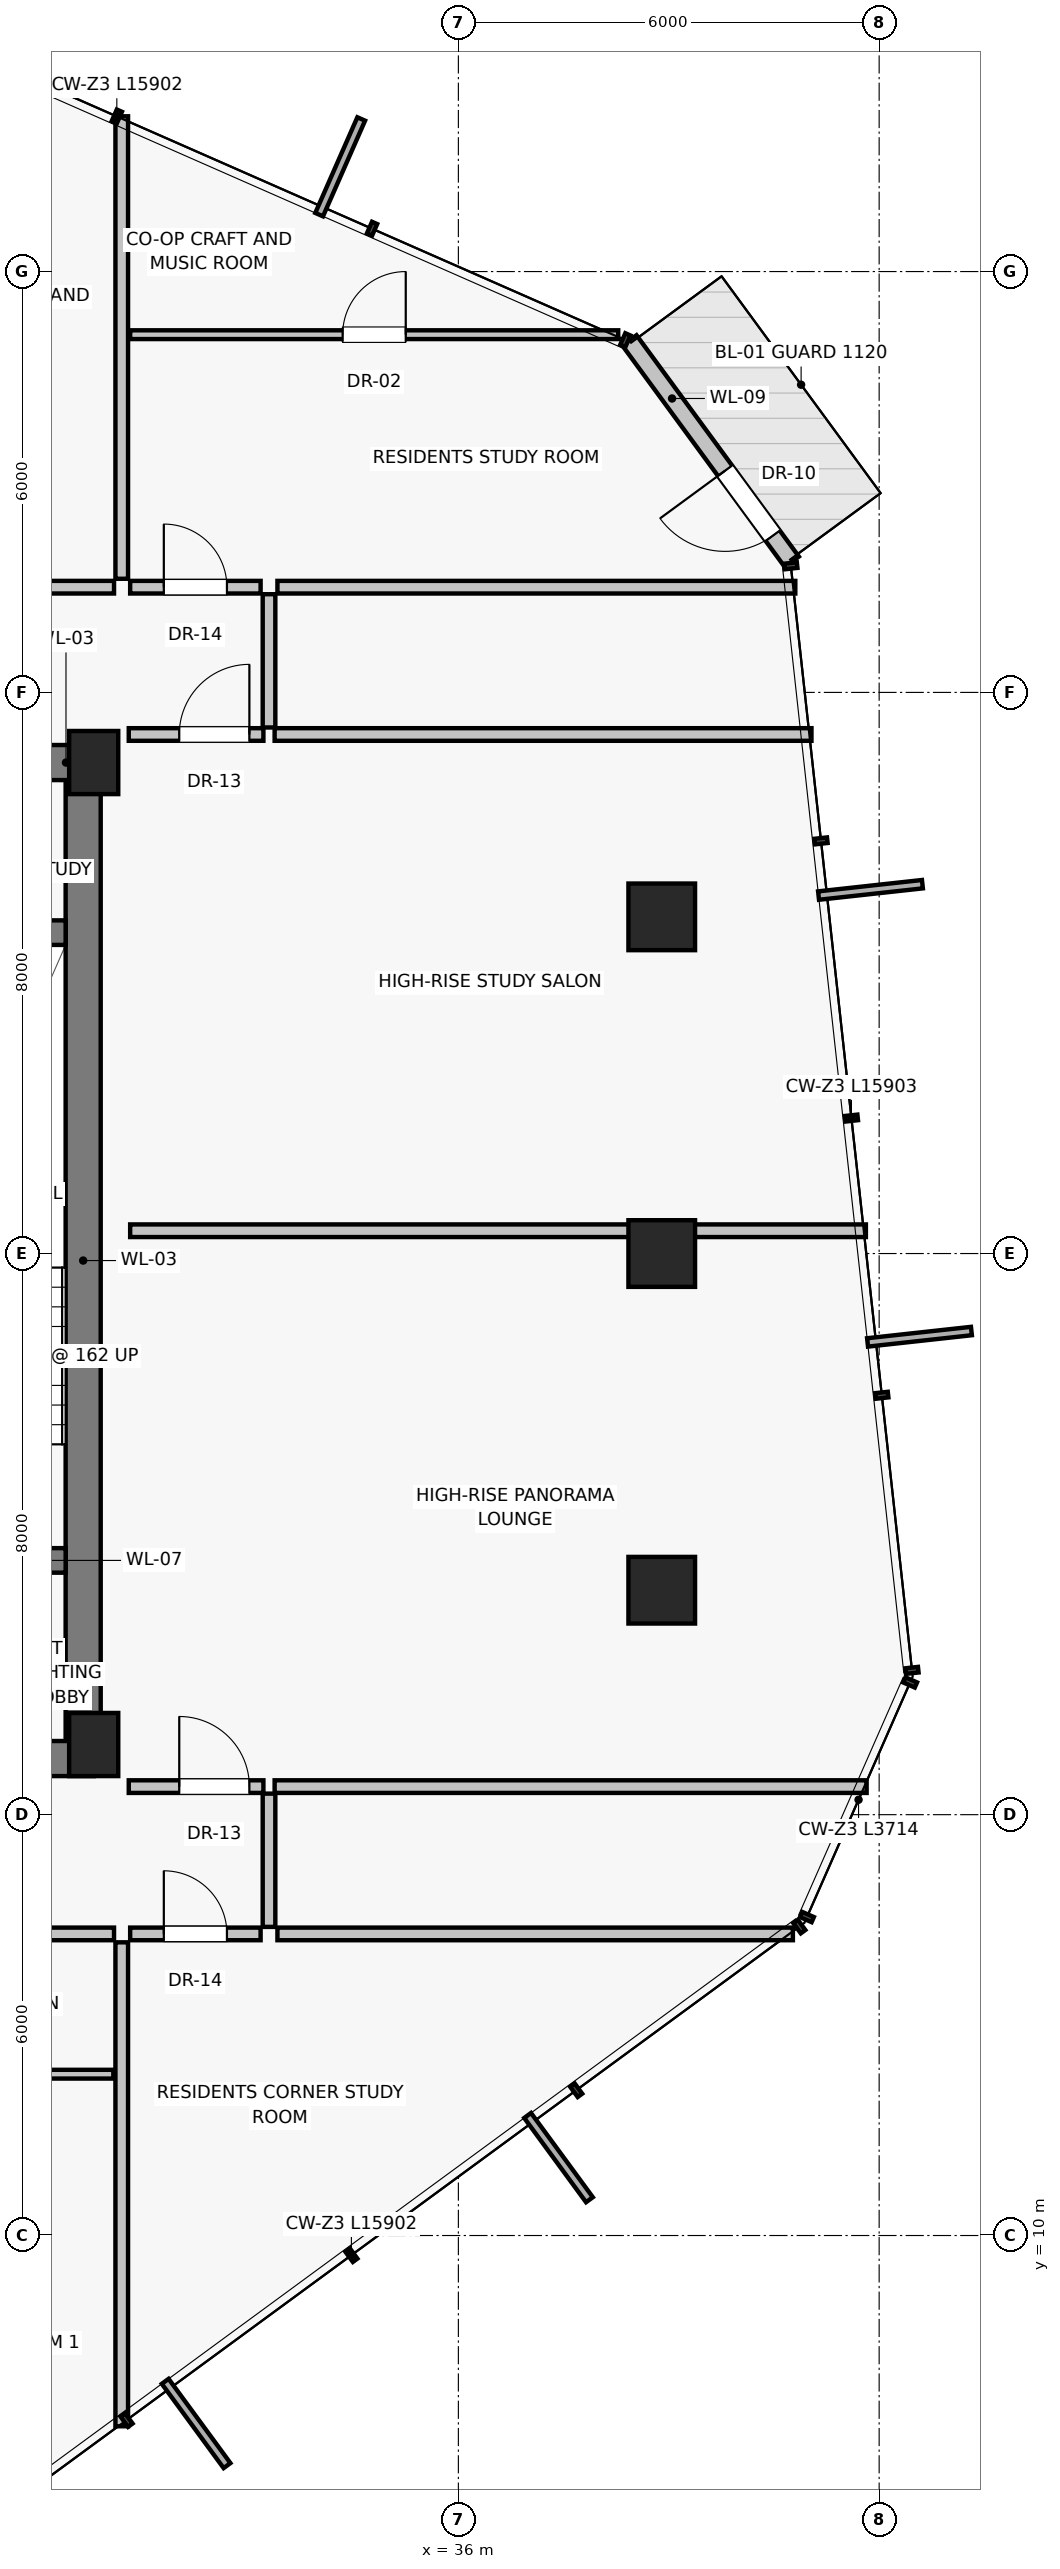
"""IFC4 building model, lengths in metres.
Left out: names, types, materials, properties, quantities, classifications, styles, units other than length and angle.
Written with IfcOpenShell. Run it as: python <this file> out.ifc"""

import sys

from ifc_helpers import new_model, si_unit, direction, frame, frame_2d, origin, origin_2d, place, context, subcontext, project, spatial, rectangle, extrude, source, transform, mapped, element, fill, save


model = new_model("IFC4")
c1 = context("Model", 3, precision=1e-05, world=origin(), true_north=direction((0.0, 1.0)))
c2 = subcontext(c1, "Body", "Model", "MODEL_VIEW")
j1 = project(units=[si_unit("LENGTHUNIT", "METRE"), si_unit("PLANEANGLEUNIT", "RADIAN")], contexts=[c1])
p1 = place(None, origin())
s1 = spatial("IfcSite", under=j1, at=p1, CompositionType="ELEMENT")
p2 = place(p1, origin())
s2 = spatial("IfcBuilding", under=s1, at=p2, CompositionType="ELEMENT")
p3 = place(p2, frame((0.0, 0.0, 185.35)))
s3 = spatial("IfcBuildingStorey", under=s2, at=p3, CompositionType="ELEMENT", Elevation=185.35)
for number, where, z_axis, x_axis in (
    (1, (30.8, 17.0, 0.0), (0.0, 0.0, 1.0), (1.0, 0.0, 0.0)),
    (2, (30.8, 31.0, 0.0), (0.0, 0.0, 1.0), (1.0, 0.0, 0.0)),
):
    element("IfcColumn", number, at=place(p3, frame(where, z_axis=z_axis, x_axis=x_axis)), inside=s3, PredefinedType="PILASTER", context=c2, shape_type="SweptSolid", body=[
        extrude(rectangle(XDim=0.7, YDim=0.9, at=origin_2d()), origin(), (0.0, 0.0, 1.0), 3.25),
    ])
for number, where, z_axis, x_axis in (
    (3, (38.9, 19.2, 0.0), (0.0, 0.0, 1.0), (1.0, 0.0, 0.0)),
    (4, (38.9, 24.0, 0.0), (0.0, 0.0, 1.0), (1.0, 0.0, 0.0)),
    (5, (38.9, 28.8, 0.0), (0.0, 0.0, 1.0), (1.0, 0.0, 0.0)),
):
    element("IfcColumn", number, at=place(p3, frame(where, z_axis=z_axis, x_axis=x_axis)), inside=s3, PredefinedType="COLUMN", context=c2, shape_type="SweptSolid", body=[
        extrude(rectangle(XDim=0.95, YDim=0.95, at=origin_2d()), origin(), (0.0, 0.0, 1.0), 3.25),
    ])
p4 = place(p3, frame((40.755, 33.862, 0.0), z_axis=(0.0, 0.0, 1.0), x_axis=(-0.591474510033, 0.806323696775, 0.0)))
e6 = element("IfcWall", 6, at=p4, inside=s3, PredefinedType="SOLIDWALL", context=c2, shape_type="SweptSolid", body=[
    extrude(rectangle(XDim=3.915, YDim=0.25, at=frame_2d((1.958, 0.0))), origin(), (0.0, 0.0, 1.0), 3.015),
])
p5 = place(p4, frame((0.46, 0.0, 0.0)))
e7 = element("IfcOpeningElement", 7, at=p5, cuts=e6, PredefinedType="OPENING", context=c2, shape_type="SweptSolid", body=[
    extrude(rectangle(XDim=1.15, YDim=2.25, at=frame_2d((0.575, 1.125))), frame((0.0, 0.135, 0.0), z_axis=(0.0, -1.0, 0.0), x_axis=(1.0, 0.0, 0.0)), (0.0, 0.0, 1.0), 0.27),
])
p6 = place(p3, frame((30.65, 16.8, 0.0), z_axis=(0.0, 0.0, 1.0), x_axis=(0.0, 1.0, 0.0)))
e8 = element("IfcWall", 8, at=p6, inside=s3, PredefinedType="SHEAR", context=c2, shape_type="SweptSolid", body=[
    extrude(rectangle(XDim=14.2, YDim=0.5, at=frame_2d((7.1, 0.0))), origin(), (0.0, 0.0, 1.0), 3.015),
])
p7 = place(p3, frame((24.95, 16.8, 0.0), z_axis=(0.0, 0.0, 1.0), x_axis=(1.0, 0.0, 0.0)))
e9 = element("IfcWall", 9, at=p7, inside=s3, PredefinedType="SHEAR", context=c2, shape_type="SweptSolid", body=[
    extrude(rectangle(XDim=5.85, YDim=0.5, at=frame_2d((2.925, 0.0))), origin(), (0.0, 0.0, 1.0), 3.015),
])
p8 = place(p7, frame((2.15, 0.0, 0.0)))
e10 = element("IfcOpeningElement", 10, at=p8, cuts=e9, PredefinedType="OPENING", context=c2, shape_type="SweptSolid", body=[
    extrude(rectangle(XDim=1.2, YDim=2.03, at=frame_2d((0.6, 1.015))), frame((0.0, 0.26, 0.0), z_axis=(0.0, -1.0, 0.0), x_axis=(1.0, 0.0, 0.0)), (0.0, 0.0, 1.0), 0.52),
])
p9 = place(p3, frame((27.0, 31.0, 0.0), z_axis=(0.0, 0.0, 1.0), x_axis=(1.0, 0.0, 0.0)))
e11 = element("IfcWall", 11, at=p9, inside=s3, PredefinedType="SHEAR", context=c2, shape_type="SweptSolid", body=[
    extrude(rectangle(XDim=3.8, YDim=0.5, at=frame_2d((1.9, 0.0))), origin(), (0.0, 0.0, 1.0), 3.015),
])
p10 = place(p9, frame((0.45, 0.0, 0.0)))
e12 = element("IfcOpeningElement", 12, at=p10, cuts=e11, PredefinedType="OPENING", context=c2, shape_type="SweptSolid", body=[
    extrude(rectangle(XDim=0.86, YDim=2.01, at=frame_2d((0.43, 1.005))), frame((0.0, 0.26, 0.0), z_axis=(0.0, -1.0, 0.0), x_axis=(1.0, 0.0, 0.0)), (0.0, 0.0, 1.0), 0.52),
])
p11 = place(p9, frame((1.9, 0.0, 0.0)))
e13 = element("IfcOpeningElement", 13, at=p11, cuts=e11, PredefinedType="OPENING", context=c2, shape_type="SweptSolid", body=[
    extrude(rectangle(XDim=0.86, YDim=2.01, at=frame_2d((0.43, 1.005))), frame((0.0, 0.26, 0.0), z_axis=(0.0, -1.0, 0.0), x_axis=(1.0, 0.0, 0.0)), (0.0, 0.0, 1.0), 0.52),
])
p12 = place(p3, frame((27.025, 19.625, 0.0), z_axis=(0.0, 0.0, 1.0), x_axis=(1.0, 0.0, 0.0)))
e14 = element("IfcWall", 14, at=p12, inside=s3, PredefinedType="SHEAR", context=c2, shape_type="SweptSolid", body=[
    extrude(rectangle(XDim=3.375, YDim=0.35, at=frame_2d((1.688, 0.0))), origin(), (0.0, 0.0, 1.0), 3.015),
])
p13 = place(p12, frame((1.05, 0.0, 0.0)))
e15 = element("IfcOpeningElement", 15, at=p13, cuts=e14, PredefinedType="OPENING", context=c2, shape_type="SweptSolid", body=[
    extrude(rectangle(XDim=1.1, YDim=2.03, at=frame_2d((0.55, 1.015))), frame((0.0, 0.185, 0.0), z_axis=(0.0, -1.0, 0.0), x_axis=(1.0, 0.0, 0.0)), (0.0, 0.0, 1.0), 0.37),
])
p14 = place(p3, frame((27.025, 28.575, 0.0), z_axis=(0.0, 0.0, 1.0), x_axis=(1.0, 0.0, 0.0)))
e16 = element("IfcWall", 16, at=p14, inside=s3, PredefinedType="SHEAR", context=c2, shape_type="SweptSolid", body=[
    extrude(rectangle(XDim=3.375, YDim=0.35, at=frame_2d((1.688, 0.0))), origin(), (0.0, 0.0, 1.0), 3.015),
])
p15 = place(p3, frame((31.2, 14.18, 0.0), z_axis=(0.0, 0.0, 1.0), x_axis=(0.0, -1.0, 0.0)))
e17 = element("IfcWall", 17, at=p15, inside=s3, PredefinedType="PARTITIONING", context=c2, shape_type="SweptSolid", body=[
    extrude(rectangle(XDim=6.899, YDim=0.18, at=frame_2d((3.45, 0.0))), origin(), (0.0, 0.0, 1.0), 3.015),
])
p16 = place(p3, frame((19.31, 14.3, 0.0), z_axis=(0.0, 0.0, 1.0), x_axis=(1.0, 0.0, 0.0)))
e18 = element("IfcWall", 18, at=p16, inside=s3, PredefinedType="PARTITIONING", context=c2, shape_type="SweptSolid", body=[
    extrude(rectangle(XDim=11.78, YDim=0.18, at=frame_2d((5.89, 0.0))), origin(), (0.0, 0.0, 1.0), 3.015),
])
p17 = place(p16, frame((3.98, 0.0, 0.0)))
e19 = element("IfcOpeningElement", 19, at=p17, cuts=e18, PredefinedType="OPENING", context=c2, shape_type="SweptSolid", body=[
    extrude(rectangle(XDim=0.95, YDim=2.02, at=frame_2d((0.475, 1.01))), frame((0.0, 0.1, 0.0), z_axis=(0.0, -1.0, 0.0), x_axis=(1.0, 0.0, 0.0)), (0.0, 0.0, 1.0), 0.2),
])
p18 = place(p3, frame((26.18, 12.3, 0.0), z_axis=(0.0, 0.0, 1.0), x_axis=(1.0, 0.0, 0.0)))
e20 = element("IfcWall", 20, at=p18, inside=s3, PredefinedType="PARTITIONING", context=c2, shape_type="SweptSolid", body=[
    extrude(rectangle(XDim=4.9, YDim=0.125, at=frame_2d((2.45, 0.0))), origin(), (0.0, 0.0, 1.0), 3.015),
])
p19 = place(p3, frame((31.2, 33.62, 0.0), z_axis=(0.0, 0.0, 1.0), x_axis=(0.0, 1.0, 0.0)))
e21 = element("IfcWall", 21, at=p19, inside=s3, PredefinedType="PARTITIONING", context=c2, shape_type="SweptSolid", body=[
    extrude(rectangle(XDim=6.593, YDim=0.18, at=frame_2d((3.297, 0.0))), origin(), (0.0, 0.0, 1.0), 3.015),
])
p20 = place(p3, frame((27.447, 33.5, 0.0), z_axis=(0.0, 0.0, 1.0), x_axis=(1.0, 0.0, 0.0)))
e22 = element("IfcWall", 22, at=p20, inside=s3, PredefinedType="PARTITIONING", context=c2, shape_type="SweptSolid", body=[
    extrude(rectangle(XDim=3.643, YDim=0.18, at=frame_2d((1.822, 0.0))), origin(), (0.0, 0.0, 1.0), 3.015),
])
p21 = place(p20, frame((1.322, 0.0, 0.0)))
e23 = element("IfcOpeningElement", 23, at=p21, cuts=e22, PredefinedType="OPENING", context=c2, shape_type="SweptSolid", body=[
    extrude(rectangle(XDim=1.0, YDim=2.01, at=frame_2d((0.5, 1.005))), frame((0.0, 0.1, 0.0), z_axis=(0.0, -1.0, 0.0), x_axis=(1.0, 0.0, 0.0)), (0.0, 0.0, 1.0), 0.2),
])
p22 = place(p3, frame((31.32, 24.325, 0.0), z_axis=(0.0, 0.0, 1.0), x_axis=(1.0, 0.0, 0.0)))
e24 = element("IfcWall", 24, at=p22, inside=s3, PredefinedType="PARTITIONING", context=c2, shape_type="SweptSolid", body=[
    extrude(rectangle(XDim=10.491, YDim=0.18, at=frame_2d((5.246, 0.0))), origin(), (0.0, 0.0, 1.0), 3.015),
])
p23 = place(p3, frame((33.3, 14.4, 0.0), z_axis=(0.0, 0.0, 1.0), x_axis=(0.0, 1.0, 0.0)))
e25 = element("IfcWall", 25, at=p23, inside=s3, PredefinedType="PARTITIONING", context=c2, shape_type="SweptSolid", body=[
    extrude(rectangle(XDim=1.9, YDim=0.18, at=frame_2d((0.95, 0.0))), origin(), (0.0, 0.0, 1.0), 3.015),
])
p24 = place(p3, frame((33.3, 31.5, 0.0), z_axis=(0.0, 0.0, 1.0), x_axis=(0.0, 1.0, 0.0)))
e26 = element("IfcWall", 26, at=p24, inside=s3, PredefinedType="PARTITIONING", context=c2, shape_type="SweptSolid", body=[
    extrude(rectangle(XDim=1.9, YDim=0.18, at=frame_2d((0.95, 0.0))), origin(), (0.0, 0.0, 1.0), 3.015),
])
p25 = place(p3, frame((31.3, 16.4, 0.0), z_axis=(0.0, 0.0, 1.0), x_axis=(1.0, 0.0, 0.0)))
e27 = element("IfcWall", 27, at=p25, inside=s3, PredefinedType="PARTITIONING", context=c2, shape_type="SweptSolid", body=[
    extrude(rectangle(XDim=1.92, YDim=0.18, at=frame_2d((0.96, 0.0))), origin(), (0.0, 0.0, 1.0), 3.015),
])
p26 = place(p25, frame((0.72, 0.0, 0.0)))
e28 = element("IfcOpeningElement", 28, at=p26, cuts=e27, PredefinedType="OPENING", context=c2, shape_type="SweptSolid", body=[
    extrude(rectangle(XDim=1.0, YDim=2.01, at=frame_2d((0.5, 1.005))), frame((0.0, 0.1, 0.0), z_axis=(0.0, -1.0, 0.0), x_axis=(1.0, 0.0, 0.0)), (0.0, 0.0, 1.0), 0.2),
])
p27 = place(p3, frame((33.38, 16.4, 0.0), z_axis=(0.0, 0.0, 1.0), x_axis=(1.0, 0.0, 0.0)))
e29 = element("IfcWall", 29, at=p27, inside=s3, PredefinedType="PARTITIONING", context=c2, shape_type="SweptSolid", body=[
    extrude(rectangle(XDim=8.442, YDim=0.18, at=frame_2d((4.221, 0.0))), origin(), (0.0, 0.0, 1.0), 3.015),
])
p28 = place(p3, frame((31.3, 31.4, 0.0), z_axis=(0.0, 0.0, 1.0), x_axis=(1.0, 0.0, 0.0)))
e30 = element("IfcWall", 30, at=p28, inside=s3, PredefinedType="PARTITIONING", context=c2, shape_type="SweptSolid", body=[
    extrude(rectangle(XDim=1.92, YDim=0.18, at=frame_2d((0.96, 0.0))), origin(), (0.0, 0.0, 1.0), 3.015),
])
p29 = place(p28, frame((0.72, 0.0, 0.0)))
e31 = element("IfcOpeningElement", 31, at=p29, cuts=e30, PredefinedType="OPENING", context=c2, shape_type="SweptSolid", body=[
    extrude(rectangle(XDim=1.0, YDim=2.01, at=frame_2d((0.5, 1.005))), frame((0.0, 0.1, 0.0), z_axis=(0.0, -1.0, 0.0), x_axis=(1.0, 0.0, 0.0)), (0.0, 0.0, 1.0), 0.2),
])
p30 = place(p3, frame((33.38, 31.4, 0.0), z_axis=(0.0, 0.0, 1.0), x_axis=(1.0, 0.0, 0.0)))
e32 = element("IfcWall", 32, at=p30, inside=s3, PredefinedType="PARTITIONING", context=c2, shape_type="SweptSolid", body=[
    extrude(rectangle(XDim=7.655, YDim=0.18, at=frame_2d((3.828, 0.0))), origin(), (0.0, 0.0, 1.0), 3.015),
])
p31 = place(p3, frame((33.42, 14.3, 0.0), z_axis=(0.0, 0.0, 1.0), x_axis=(1.0, 0.0, 0.0)))
e33 = element("IfcWall", 33, at=p31, inside=s3, PredefinedType="PARTITIONING", context=c2, shape_type="SweptSolid", body=[
    extrude(rectangle(XDim=7.35, YDim=0.18, at=frame_2d((3.675, 0.0))), origin(), (0.0, 0.0, 1.0), 3.015),
])
p32 = place(p3, frame((31.32, 14.3, 0.0), z_axis=(0.0, 0.0, 1.0), x_axis=(1.0, 0.0, 0.0)))
e34 = element("IfcWall", 34, at=p32, inside=s3, PredefinedType="PARTITIONING", context=c2, shape_type="SweptSolid", body=[
    extrude(rectangle(XDim=1.86, YDim=0.18, at=frame_2d((0.93, 0.0))), origin(), (0.0, 0.0, 1.0), 3.015),
])
p33 = place(p32, frame((0.48, 0.0, 0.0)))
e35 = element("IfcOpeningElement", 35, at=p33, cuts=e34, PredefinedType="OPENING", context=c2, shape_type="SweptSolid", body=[
    extrude(rectangle(XDim=0.9, YDim=2.01, at=frame_2d((0.45, 1.005))), frame((0.0, 0.1, 0.0), z_axis=(0.0, -1.0, 0.0), x_axis=(1.0, 0.0, 0.0)), (0.0, 0.0, 1.0), 0.2),
])
p34 = place(p3, frame((33.42, 33.5, 0.0), z_axis=(0.0, 0.0, 1.0), x_axis=(1.0, 0.0, 0.0)))
e36 = element("IfcWall", 36, at=p34, inside=s3, PredefinedType="PARTITIONING", context=c2, shape_type="SweptSolid", body=[
    extrude(rectangle(XDim=7.385, YDim=0.18, at=frame_2d((3.692, 0.0))), origin(), (0.0, 0.0, 1.0), 3.015),
])
p35 = place(p3, frame((31.32, 33.5, 0.0), z_axis=(0.0, 0.0, 1.0), x_axis=(1.0, 0.0, 0.0)))
e37 = element("IfcWall", 37, at=p35, inside=s3, PredefinedType="PARTITIONING", context=c2, shape_type="SweptSolid", body=[
    extrude(rectangle(XDim=1.86, YDim=0.18, at=frame_2d((0.93, 0.0))), origin(), (0.0, 0.0, 1.0), 3.015),
])
p36 = place(p35, frame((0.48, 0.0, 0.0)))
e38 = element("IfcOpeningElement", 38, at=p36, cuts=e37, PredefinedType="OPENING", context=c2, shape_type="SweptSolid", body=[
    extrude(rectangle(XDim=0.9, YDim=2.01, at=frame_2d((0.45, 1.005))), frame((0.0, 0.1, 0.0), z_axis=(0.0, -1.0, 0.0), x_axis=(1.0, 0.0, 0.0)), (0.0, 0.0, 1.0), 0.2),
])
p37 = place(p3, frame((31.32, 37.1, 0.0), z_axis=(0.0, 0.0, 1.0), x_axis=(1.0, 0.0, 0.0)))
e39 = element("IfcWall", 39, at=p37, inside=s3, PredefinedType="PARTITIONING", context=c2, shape_type="SweptSolid", body=[
    extrude(rectangle(XDim=6.959, YDim=0.125, at=frame_2d((3.479, 0.0))), origin(), (0.0, 0.0, 1.0), 3.015),
])
p38 = place(p37, frame((3.03, 0.0, 0.0)))
e40 = element("IfcOpeningElement", 40, at=p38, cuts=e39, PredefinedType="OPENING", context=c2, shape_type="SweptSolid", body=[
    extrude(rectangle(XDim=0.9, YDim=2.01, at=frame_2d((0.45, 1.005))), frame((0.0, 0.073, 0.0), z_axis=(0.0, -1.0, 0.0), x_axis=(1.0, 0.0, 0.0)), (0.0, 0.0, 1.0), 0.145),
])
m1 = source(origin(), c2, "Body", "SweptSolid", [
    extrude(rectangle(XDim=1.15, YDim=2.25, at=frame_2d((0.575, 1.125))), frame((0.0, 0.025, 0.0), z_axis=(0.0, -1.0, 0.0), x_axis=(1.0, 0.0, 0.0)), (0.0, 0.0, 1.0), 0.05),
])
p39 = place(p5, frame((1.15, 0.0, 0.0), z_axis=(0.0, 0.0, 1.0), x_axis=(-1.0, 0.0, 0.0)))
e41 = element("IfcDoor", 41, at=p39, inside=s3, OperationType="SINGLE_SWING_RIGHT", PredefinedType="DOOR", context=c2, shape_type="MappedRepresentation", body=[
    mapped(m1, transform((0.0, 0.0, 0.0), scale=1.0)),
])
fill(e7, e41)
m2 = source(origin(), c2, "Body", "SweptSolid", [
    extrude(rectangle(XDim=1.0, YDim=2.01, at=frame_2d((0.5, 1.005))), frame((0.0, 0.025, 0.0), z_axis=(0.0, -1.0, 0.0), x_axis=(1.0, 0.0, 0.0)), (0.0, 0.0, 1.0), 0.05),
])
p40 = place(p26, origin())
e42 = element("IfcDoor", 42, at=p40, inside=s3, OperationType="SINGLE_SWING_LEFT", PredefinedType="DOOR", context=c2, shape_type="MappedRepresentation", body=[
    mapped(m2, transform((0.0, 0.0, 0.0), scale=1.0)),
])
fill(e28, e42)
p41 = place(p29, origin())
e43 = element("IfcDoor", 43, at=p41, inside=s3, OperationType="SINGLE_SWING_RIGHT", PredefinedType="DOOR", context=c2, shape_type="MappedRepresentation", body=[
    mapped(m2, transform((0.0, 0.0, 0.0), scale=1.0)),
])
fill(e31, e43)
m3 = source(origin(), c2, "Body", "SweptSolid", [
    extrude(rectangle(XDim=0.9, YDim=2.01, at=frame_2d((0.45, 1.005))), frame((0.0, 0.025, 0.0), z_axis=(0.0, -1.0, 0.0), x_axis=(1.0, 0.0, 0.0)), (0.0, 0.0, 1.0), 0.05),
])
p42 = place(p33, origin())
e44 = element("IfcDoor", 44, at=p42, inside=s3, OperationType="SINGLE_SWING_LEFT", PredefinedType="DOOR", context=c2, shape_type="MappedRepresentation", body=[
    mapped(m3, transform((0.0, 0.0, 0.0), scale=1.0)),
])
fill(e35, e44)
p43 = place(p36, origin())
e45 = element("IfcDoor", 45, at=p43, inside=s3, OperationType="SINGLE_SWING_LEFT", PredefinedType="DOOR", context=c2, shape_type="MappedRepresentation", body=[
    mapped(m3, transform((0.0, 0.0, 0.0), scale=1.0)),
])
fill(e38, e45)
p44 = place(p38, origin())
e46 = element("IfcDoor", 46, at=p44, inside=s3, OperationType="SINGLE_SWING_RIGHT", PredefinedType="DOOR", context=c2, shape_type="MappedRepresentation", body=[
    mapped(m3, transform((0.0, 0.0, 0.0), scale=1.0)),
])
fill(e40, e46)
save(model, sys.argv[1])
